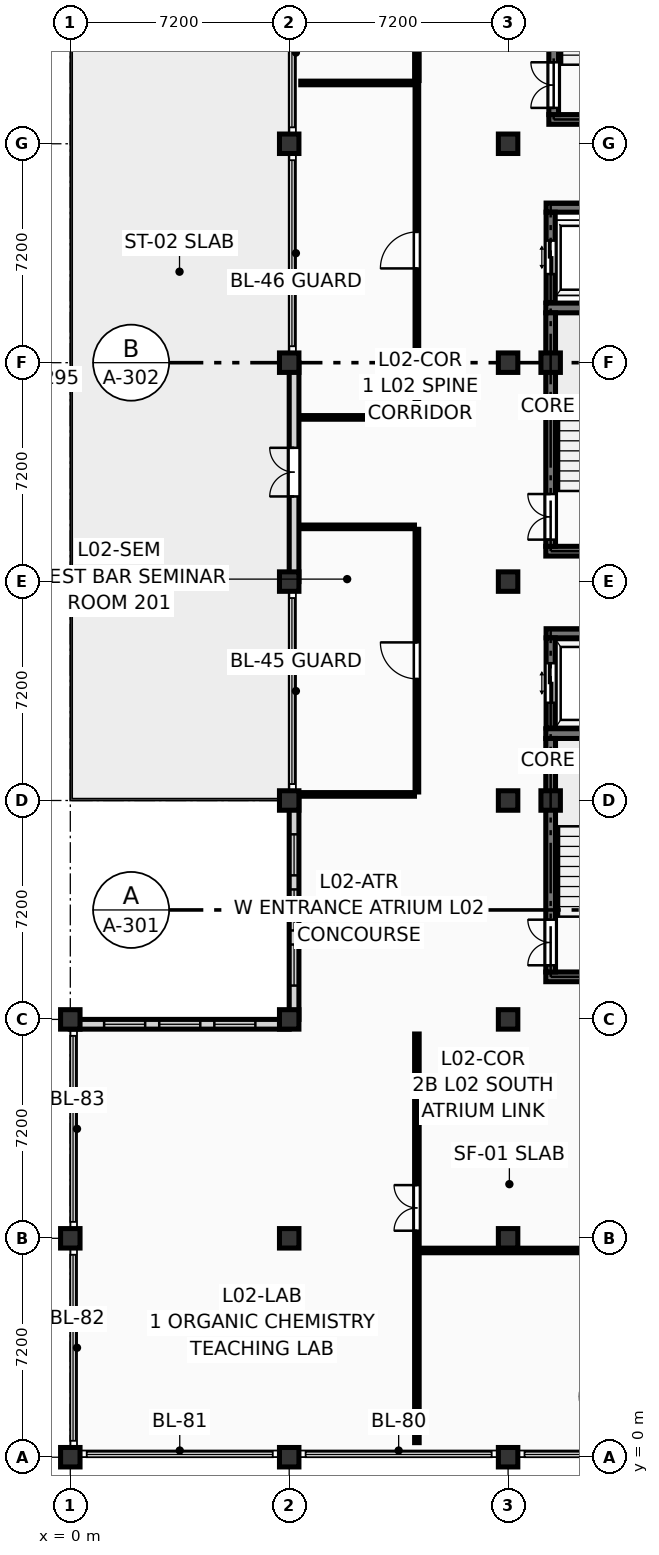
"""IFC4 building model, lengths in metres.
Left out: names, types, materials, properties, quantities, classifications, styles, units other than length and angle.
Written with IfcOpenShell. Run it as: python <this file> out.ifc"""

import sys

from ifc_helpers import new_model, si_unit, direction, frame, frame_2d, origin, origin_2d, place, context, subcontext, project, spatial, rectangle, extrude, element, fill, save


model = new_model("IFC4")
c1 = context("Model", 3, precision=1e-05, world=origin(), true_north=direction((0.0, 1.0)))
c2 = subcontext(c1, "Body", "Model", "MODEL_VIEW")
j1 = project(units=[si_unit("LENGTHUNIT", "METRE"), si_unit("PLANEANGLEUNIT", "RADIAN")], contexts=[c1])
p1 = place(None, origin())
s1 = spatial("IfcSite", under=j1, at=p1, CompositionType="ELEMENT")
p2 = place(p1, origin())
s2 = spatial("IfcBuilding", under=s1, at=p2, CompositionType="ELEMENT")
p3 = place(p2, frame((0.0, 0.0, 8.55)))
s3 = spatial("IfcBuildingStorey", under=s2, at=p3, CompositionType="ELEMENT", Elevation=8.55)
for number, where, z_axis, x_axis in (
    (1, (0.0, 0.0, 0.0), (0.0, 0.0, 1.0), (1.0, 0.0, 0.0)),
    (2, (0.0, 7.2, 0.0), (0.0, 0.0, 1.0), (1.0, 0.0, 0.0)),
    (3, (0.0, 14.4, 0.0), (0.0, 0.0, 1.0), (1.0, 0.0, 0.0)),
    (4, (7.2, 0.0, 0.0), (0.0, 0.0, 1.0), (1.0, 0.0, 0.0)),
    (5, (7.2, 7.2, 0.0), (0.0, 0.0, 1.0), (1.0, 0.0, 0.0)),
    (6, (7.2, 14.4, 0.0), (0.0, 0.0, 1.0), (1.0, 0.0, 0.0)),
    (7, (7.2, 21.6, 0.0), (0.0, 0.0, 1.0), (1.0, 0.0, 0.0)),
    (8, (7.2, 28.8, 0.0), (0.0, 0.0, 1.0), (1.0, 0.0, 0.0)),
    (9, (7.2, 36.0, 0.0), (0.0, 0.0, 1.0), (1.0, 0.0, 0.0)),
    (10, (7.2, 43.2, 0.0), (0.0, 0.0, 1.0), (1.0, 0.0, 0.0)),
    (11, (14.4, 0.0, 0.0), (0.0, 0.0, 1.0), (1.0, 0.0, 0.0)),
    (12, (14.4, 7.2, 0.0), (0.0, 0.0, 1.0), (1.0, 0.0, 0.0)),
    (13, (14.4, 14.4, 0.0), (0.0, 0.0, 1.0), (1.0, 0.0, 0.0)),
    (14, (14.4, 21.6, 0.0), (0.0, 0.0, 1.0), (1.0, 0.0, 0.0)),
    (15, (14.4, 28.8, 0.0), (0.0, 0.0, 1.0), (1.0, 0.0, 0.0)),
    (16, (14.4, 36.0, 0.0), (0.0, 0.0, 1.0), (1.0, 0.0, 0.0)),
    (17, (14.4, 43.2, 0.0), (0.0, 0.0, 1.0), (1.0, 0.0, 0.0)),
    (18, (15.8, 21.6, 0.0), (0.0, 0.0, 1.0), (1.0, 0.0, 0.0)),
    (19, (15.8, 36.0, 0.0), (0.0, 0.0, 1.0), (1.0, 0.0, 0.0)),
):
    element("IfcColumn", number, at=place(p3, frame(where, z_axis=z_axis, x_axis=x_axis)), inside=s3, PredefinedType="COLUMN", context=c2, shape_type="SweptSolid", body=[
        extrude(rectangle(XDim=0.64, YDim=0.64, at=origin_2d()), origin(), (0.0, 0.0, 1.0), 3.6),
    ])
p4 = place(p3, frame((7.36, 14.4, 0.0), z_axis=(0.0, 0.0, 1.0), x_axis=(0.0, 1.0, 0.0)))
e20 = element("IfcWall", 20, at=p4, inside=s3, PredefinedType="SOLIDWALL", context=c2, shape_type="SweptSolid", body=[
    extrude(rectangle(XDim=7.2, YDim=0.32, at=frame_2d((3.6, 0.0))), origin(), (0.0, 0.0, 1.0), 2.84),
])
p5 = place(p4, frame((1.113, 0.0, 0.18)))
e21 = element("IfcOpeningElement", 21, at=p5, cuts=e20, PredefinedType="OPENING", context=c2, shape_type="SweptSolid", body=[
    extrude(rectangle(XDim=1.35, YDim=2.45, at=frame_2d((0.675, 1.225))), frame((0.0, 0.172, 0.0), z_axis=(0.0, -1.0, 0.0), x_axis=(1.0, 0.0, 0.0)), (0.0, 0.0, 1.0), 0.344),
])
p6 = place(p4, frame((2.925, 0.0, 0.18)))
e22 = element("IfcOpeningElement", 22, at=p6, cuts=e20, PredefinedType="OPENING", context=c2, shape_type="SweptSolid", body=[
    extrude(rectangle(XDim=1.35, YDim=2.45, at=frame_2d((0.675, 1.225))), frame((0.0, 0.172, 0.0), z_axis=(0.0, -1.0, 0.0), x_axis=(1.0, 0.0, 0.0)), (0.0, 0.0, 1.0), 0.344),
])
p7 = place(p4, frame((4.738, 0.0, 0.18)))
e23 = element("IfcOpeningElement", 23, at=p7, cuts=e20, PredefinedType="OPENING", context=c2, shape_type="SweptSolid", body=[
    extrude(rectangle(XDim=1.35, YDim=2.45, at=frame_2d((0.675, 1.225))), frame((0.0, 0.172, 0.0), z_axis=(0.0, -1.0, 0.0), x_axis=(1.0, 0.0, 0.0)), (0.0, 0.0, 1.0), 0.344),
])
p8 = place(p3, frame((7.36, 28.8, 0.0), z_axis=(0.0, 0.0, 1.0), x_axis=(0.0, 1.0, 0.0)))
e24 = element("IfcWall", 24, at=p8, inside=s3, PredefinedType="SOLIDWALL", context=c2, shape_type="SweptSolid", body=[
    extrude(rectangle(XDim=7.2, YDim=0.32, at=frame_2d((3.6, 0.0))), origin(), (0.0, 0.0, 1.0), 2.84),
])
p9 = place(p8, frame((2.8, 0.0, 0.0)))
e25 = element("IfcOpeningElement", 25, at=p9, cuts=e24, PredefinedType="OPENING", context=c2, shape_type="SweptSolid", body=[
    extrude(rectangle(XDim=1.6, YDim=2.25, at=frame_2d((0.8, 1.125))), frame((0.0, 0.172, 0.0), z_axis=(0.0, -1.0, 0.0), x_axis=(1.0, 0.0, 0.0)), (0.0, 0.0, 1.0), 0.344),
])
p10 = place(p3, frame((0.0, 14.24, 0.0), z_axis=(0.0, 0.0, 1.0), x_axis=(1.0, 0.0, 0.0)))
e26 = element("IfcWall", 26, at=p10, inside=s3, PredefinedType="SOLIDWALL", context=c2, shape_type="SweptSolid", body=[
    extrude(rectangle(XDim=7.2, YDim=0.32, at=frame_2d((3.6, 0.0))), origin(), (0.0, 0.0, 1.0), 2.84),
])
p11 = place(p10, frame((1.113, 0.0, 0.18)))
e27 = element("IfcOpeningElement", 27, at=p11, cuts=e26, PredefinedType="OPENING", context=c2, shape_type="SweptSolid", body=[
    extrude(rectangle(XDim=1.35, YDim=2.45, at=frame_2d((0.675, 1.225))), frame((0.0, 0.172, 0.0), z_axis=(0.0, -1.0, 0.0), x_axis=(1.0, 0.0, 0.0)), (0.0, 0.0, 1.0), 0.344),
])
p12 = place(p10, frame((2.925, 0.0, 0.18)))
e28 = element("IfcOpeningElement", 28, at=p12, cuts=e26, PredefinedType="OPENING", context=c2, shape_type="SweptSolid", body=[
    extrude(rectangle(XDim=1.35, YDim=2.45, at=frame_2d((0.675, 1.225))), frame((0.0, 0.172, 0.0), z_axis=(0.0, -1.0, 0.0), x_axis=(1.0, 0.0, 0.0)), (0.0, 0.0, 1.0), 0.344),
])
p13 = place(p10, frame((4.738, 0.0, 0.18)))
e29 = element("IfcOpeningElement", 29, at=p13, cuts=e26, PredefinedType="OPENING", context=c2, shape_type="SweptSolid", body=[
    extrude(rectangle(XDim=1.35, YDim=2.45, at=frame_2d((0.675, 1.225))), frame((0.0, 0.172, 0.0), z_axis=(0.0, -1.0, 0.0), x_axis=(1.0, 0.0, 0.0)), (0.0, 0.0, 1.0), 0.344),
])
for number, where, z_axis, x_axis in (
    (30, (15.64, 15.8, 0.0), (0.0, 0.0, 1.0), (1.0, 0.0, 0.0)),
    (31, (15.64, 23.8, 0.0), (0.0, 0.0, 1.0), (1.0, 0.0, 0.0)),
):
    element("IfcWall", number, at=place(p3, frame(where, z_axis=z_axis, x_axis=x_axis)), inside=s3, PredefinedType="SHEAR", context=c2, shape_type="SweptSolid", body=[
        extrude(rectangle(XDim=4.84, YDim=0.32, at=frame_2d((2.42, 0.0))), origin(), (0.0, 0.0, 1.0), 3.39),
    ])
p14 = place(p3, frame((15.8, 15.96, 0.0), z_axis=(0.0, 0.0, 1.0), x_axis=(0.0, 1.0, 0.0)))
e32 = element("IfcWall", 32, at=p14, inside=s3, PredefinedType="SHEAR", context=c2, shape_type="SweptSolid", body=[
    extrude(rectangle(XDim=7.68, YDim=0.32, at=frame_2d((3.84, 0.0))), origin(), (0.0, 0.0, 1.0), 3.39),
])
p15 = place(p14, frame((0.22, 0.0, 0.0)))
e33 = element("IfcOpeningElement", 33, at=p15, cuts=e32, PredefinedType="OPENING", context=c2, shape_type="SweptSolid", body=[
    extrude(rectangle(XDim=1.5, YDim=2.2, at=frame_2d((0.75, 1.1))), frame((0.0, 0.172, 0.0), z_axis=(0.0, -1.0, 0.0), x_axis=(1.0, 0.0, 0.0)), (0.0, 0.0, 1.0), 0.344),
])
for number, where, z_axis, x_axis in (
    (34, (15.64, 29.8, 0.0), (0.0, 0.0, 1.0), (1.0, 0.0, 0.0)),
    (35, (15.64, 37.8, 0.0), (0.0, 0.0, 1.0), (1.0, 0.0, 0.0)),
):
    element("IfcWall", number, at=place(p3, frame(where, z_axis=z_axis, x_axis=x_axis)), inside=s3, PredefinedType="SHEAR", context=c2, shape_type="SweptSolid", body=[
        extrude(rectangle(XDim=4.84, YDim=0.32, at=frame_2d((2.42, 0.0))), origin(), (0.0, 0.0, 1.0), 3.39),
    ])
p16 = place(p3, frame((15.8, 29.96, 0.0), z_axis=(0.0, 0.0, 1.0), x_axis=(0.0, 1.0, 0.0)))
e36 = element("IfcWall", 36, at=p16, inside=s3, PredefinedType="SHEAR", context=c2, shape_type="SweptSolid", body=[
    extrude(rectangle(XDim=7.68, YDim=0.32, at=frame_2d((3.84, 0.0))), origin(), (0.0, 0.0, 1.0), 3.39),
])
p17 = place(p16, frame((0.22, 0.0, 0.0)))
e37 = element("IfcOpeningElement", 37, at=p17, cuts=e36, PredefinedType="OPENING", context=c2, shape_type="SweptSolid", body=[
    extrude(rectangle(XDim=1.5, YDim=2.2, at=frame_2d((0.75, 1.1))), frame((0.0, 0.172, 0.0), z_axis=(0.0, -1.0, 0.0), x_axis=(1.0, 0.0, 0.0)), (0.0, 0.0, 1.0), 0.344),
])
p18 = place(p3, frame((15.74, 44.0, 0.0), z_axis=(0.0, 0.0, 1.0), x_axis=(1.0, 0.0, 0.0)))
e38 = element("IfcWall", 38, at=p18, inside=s3, PredefinedType="SHEAR", context=c2, shape_type="SweptSolid", body=[
    extrude(rectangle(XDim=4.44, YDim=0.32, at=frame_2d((2.22, 0.0))), origin(), (0.0, 0.0, 1.0), 3.39),
])
p19 = place(p3, frame((15.9, 44.16, 0.0), z_axis=(0.0, 0.0, 1.0), x_axis=(0.0, 1.0, 0.0)))
e39 = element("IfcWall", 39, at=p19, inside=s3, PredefinedType="SHEAR", context=c2, shape_type="SweptSolid", body=[
    extrude(rectangle(XDim=7.28, YDim=0.32, at=frame_2d((3.64, 0.0))), origin(), (0.0, 0.0, 1.0), 3.39),
])
p20 = place(p19, frame((0.22, 0.0, 0.0)))
e40 = element("IfcOpeningElement", 40, at=p20, cuts=e39, PredefinedType="OPENING", context=c2, shape_type="SweptSolid", body=[
    extrude(rectangle(XDim=1.5, YDim=2.2, at=frame_2d((0.75, 1.1))), frame((0.0, 0.172, 0.0), z_axis=(0.0, -1.0, 0.0), x_axis=(1.0, 0.0, 0.0)), (0.0, 0.0, 1.0), 0.344),
])
p21 = place(p3, frame((15.65, 27.1, 0.0), z_axis=(0.0, 0.0, 1.0), x_axis=(1.0, 0.0, 0.0)))
e41 = element("IfcWall", 41, at=p21, inside=s3, PredefinedType="SHEAR", context=c2, shape_type="SweptSolid", body=[
    extrude(rectangle(XDim=2.56, YDim=0.3, at=frame_2d((1.28, 0.0))), origin(), (0.0, 0.0, 1.0), 3.39),
])
p22 = place(p3, frame((15.8, 23.98, 0.0), z_axis=(0.0, 0.0, 1.0), x_axis=(0.0, 1.0, 0.0)))
e42 = element("IfcWall", 42, at=p22, inside=s3, PredefinedType="SHEAR", context=c2, shape_type="SweptSolid", body=[
    extrude(rectangle(XDim=2.97, YDim=0.3, at=frame_2d((1.485, 0.0))), origin(), (0.0, 0.0, 1.0), 3.39),
])
p23 = place(p22, frame((0.835, 0.0, 0.0)))
e43 = element("IfcOpeningElement", 43, at=p23, cuts=e42, PredefinedType="OPENING", context=c2, shape_type="SweptSolid", body=[
    extrude(rectangle(XDim=1.3, YDim=2.25, at=frame_2d((0.65, 1.125))), frame((0.0, 0.162, 0.0), z_axis=(0.0, -1.0, 0.0), x_axis=(1.0, 0.0, 0.0)), (0.0, 0.0, 1.0), 0.324),
])
p24 = place(p3, frame((15.65, 41.1, 0.0), z_axis=(0.0, 0.0, 1.0), x_axis=(1.0, 0.0, 0.0)))
e44 = element("IfcWall", 44, at=p24, inside=s3, PredefinedType="SHEAR", context=c2, shape_type="SweptSolid", body=[
    extrude(rectangle(XDim=2.56, YDim=0.3, at=frame_2d((1.28, 0.0))), origin(), (0.0, 0.0, 1.0), 3.39),
])
p25 = place(p3, frame((15.8, 37.98, 0.0), z_axis=(0.0, 0.0, 1.0), x_axis=(0.0, 1.0, 0.0)))
e45 = element("IfcWall", 45, at=p25, inside=s3, PredefinedType="SHEAR", context=c2, shape_type="SweptSolid", body=[
    extrude(rectangle(XDim=2.97, YDim=0.3, at=frame_2d((1.485, 0.0))), origin(), (0.0, 0.0, 1.0), 3.39),
])
p26 = place(p25, frame((0.935, 0.0, 0.0)))
e46 = element("IfcOpeningElement", 46, at=p26, cuts=e45, PredefinedType="OPENING", context=c2, shape_type="SweptSolid", body=[
    extrude(rectangle(XDim=1.1, YDim=2.2, at=frame_2d((0.55, 1.1))), frame((0.0, 0.162, 0.0), z_axis=(0.0, -1.0, 0.0), x_axis=(1.0, 0.0, 0.0)), (0.0, 0.0, 1.0), 0.324),
])
p27 = place(p3, frame((11.4, 0.48, 0.0), z_axis=(0.0, 0.0, 1.0), x_axis=(0.0, 1.0, 0.0)))
e47 = element("IfcWall", 47, at=p27, inside=s3, PredefinedType="PARTITIONING", context=c2, shape_type="SweptSolid", body=[
    extrude(rectangle(XDim=13.44, YDim=0.15, at=frame_2d((6.72, 0.0))), origin(), (0.0, 0.0, 1.0), 3.375),
])
p28 = place(p27, frame((6.97, 0.0, 0.0)))
e48 = element("IfcOpeningElement", 48, at=p28, cuts=e47, PredefinedType="OPENING", context=c2, shape_type="SweptSolid", body=[
    extrude(rectangle(XDim=1.5, YDim=2.2, at=frame_2d((0.75, 1.1))), frame((0.0, 0.087, 0.0), z_axis=(0.0, -1.0, 0.0), x_axis=(1.0, 0.0, 0.0)), (0.0, 0.0, 1.0), 0.174),
])
p29 = place(p3, frame((11.515, 6.8, 0.0), z_axis=(0.0, 0.0, 1.0), x_axis=(1.0, 0.0, 0.0)))
e49 = element("IfcWall", 49, at=p29, inside=s3, PredefinedType="PARTITIONING", context=c2, shape_type="SweptSolid", body=[
    extrude(rectangle(XDim=17.005, YDim=0.15, at=frame_2d((8.502, 0.0))), origin(), (0.0, 0.0, 1.0), 3.375),
])
p30 = place(p29, frame((6.497, 0.0, 0.0)))
e50 = element("IfcOpeningElement", 50, at=p30, cuts=e49, PredefinedType="OPENING", context=c2, shape_type="SweptSolid", body=[
    extrude(rectangle(XDim=1.5, YDim=2.2, at=frame_2d((0.75, 1.1))), frame((0.0, 0.087, 0.0), z_axis=(0.0, -1.0, 0.0), x_axis=(1.0, 0.0, 0.0)), (0.0, 0.0, 1.0), 0.174),
])
p31 = place(p3, frame((7.58, 21.8, 0.0), z_axis=(0.0, 0.0, 1.0), x_axis=(1.0, 0.0, 0.0)))
e51 = element("IfcWall", 51, at=p31, inside=s3, PredefinedType="PARTITIONING", context=c2, shape_type="SweptSolid", body=[
    extrude(rectangle(XDim=3.74, YDim=0.12, at=frame_2d((1.87, 0.0))), origin(), (0.0, 0.0, 1.0), 2.595),
])
p32 = place(p3, frame((11.4, 21.88, 0.0), z_axis=(0.0, 0.0, 1.0), x_axis=(0.0, 1.0, 0.0)))
e52 = element("IfcWall", 52, at=p32, inside=s3, PredefinedType="PARTITIONING", context=c2, shape_type="SweptSolid", body=[
    extrude(rectangle(XDim=8.64, YDim=0.12, at=frame_2d((4.32, 0.0))), origin(), (0.0, 0.0, 1.0), 3.375),
])
p33 = place(p32, frame((3.72, 0.0, 0.0)))
e53 = element("IfcOpeningElement", 53, at=p33, cuts=e52, PredefinedType="OPENING", context=c2, shape_type="SweptSolid", body=[
    extrude(rectangle(XDim=1.2, YDim=2.15, at=frame_2d((0.6, 1.075))), frame((0.0, 0.072, 0.0), z_axis=(0.0, -1.0, 0.0), x_axis=(1.0, 0.0, 0.0)), (0.0, 0.0, 1.0), 0.144),
])
for number, where, z_axis, x_axis in (
    (54, (7.58, 30.6, 0.0), (0.0, 0.0, 1.0), (1.0, 0.0, 0.0)),
    (55, (7.58, 34.2, 0.0), (0.0, 0.0, 1.0), (1.0, 0.0, 0.0)),
):
    element("IfcWall", number, at=place(p3, frame(where, z_axis=z_axis, x_axis=x_axis)), inside=s3, PredefinedType="PARTITIONING", context=c2, shape_type="SweptSolid", body=[
        extrude(rectangle(XDim=3.74, YDim=0.12, at=frame_2d((1.87, 0.0))), origin(), (0.0, 0.0, 1.0), 3.375),
    ])
p34 = place(p3, frame((11.4, 34.28, 0.0), z_axis=(0.0, 0.0, 1.0), x_axis=(0.0, 1.0, 0.0)))
e56 = element("IfcWall", 56, at=p34, inside=s3, PredefinedType="PARTITIONING", context=c2, shape_type="SweptSolid", body=[
    extrude(rectangle(XDim=10.84, YDim=0.12, at=frame_2d((5.42, 0.0))), origin(), (0.0, 0.0, 1.0), 3.375),
])
p35 = place(p34, frame((4.82, 0.0, 0.0)))
e57 = element("IfcOpeningElement", 57, at=p35, cuts=e56, PredefinedType="OPENING", context=c2, shape_type="SweptSolid", body=[
    extrude(rectangle(XDim=1.2, YDim=2.15, at=frame_2d((0.6, 1.075))), frame((0.0, 0.072, 0.0), z_axis=(0.0, -1.0, 0.0), x_axis=(1.0, 0.0, 0.0)), (0.0, 0.0, 1.0), 0.144),
])
p36 = place(p3, frame((7.58, 45.2, 0.0), z_axis=(0.0, 0.0, 1.0), x_axis=(1.0, 0.0, 0.0)))
e58 = element("IfcWall", 58, at=p36, inside=s3, PredefinedType="PARTITIONING", context=c2, shape_type="SweptSolid", body=[
    extrude(rectangle(XDim=3.74, YDim=0.12, at=frame_2d((1.87, 0.0))), origin(), (0.0, 0.0, 1.0), 3.375),
])
p37 = place(p3, frame((11.4, 45.28, 0.0), z_axis=(0.0, 0.0, 1.0), x_axis=(0.0, 1.0, 0.0)))
e59 = element("IfcWall", 59, at=p37, inside=s3, PredefinedType="PARTITIONING", context=c2, shape_type="SweptSolid", body=[
    extrude(rectangle(XDim=10.64, YDim=0.15, at=frame_2d((5.32, 0.0))), origin(), (0.0, 0.0, 1.0), 3.375),
])
p38 = place(p37, frame((4.57, 0.0, 0.0)))
e60 = element("IfcOpeningElement", 60, at=p38, cuts=e59, PredefinedType="OPENING", context=c2, shape_type="SweptSolid", body=[
    extrude(rectangle(XDim=1.5, YDim=2.2, at=frame_2d((0.75, 1.1))), frame((0.0, 0.087, 0.0), z_axis=(0.0, -1.0, 0.0), x_axis=(1.0, 0.0, 0.0)), (0.0, 0.0, 1.0), 0.174),
])
p39 = place(p5, origin())
e61 = element("IfcWindow", 61, at=p39, inside=s3, PartitioningType="SINGLE_PANEL", PredefinedType="WINDOW", context=c2, shape_type="SweptSolid", body=[
    extrude(rectangle(XDim=1.35, YDim=2.45, at=frame_2d((0.675, 1.225))), frame((0.0, 0.03, 0.0), z_axis=(0.0, -1.0, 0.0), x_axis=(1.0, 0.0, 0.0)), (0.0, 0.0, 1.0), 0.06),
])
fill(e21, e61)
p40 = place(p6, origin())
e62 = element("IfcWindow", 62, at=p40, inside=s3, PartitioningType="SINGLE_PANEL", PredefinedType="WINDOW", context=c2, shape_type="SweptSolid", body=[
    extrude(rectangle(XDim=1.35, YDim=2.45, at=frame_2d((0.675, 1.225))), frame((0.0, 0.03, 0.0), z_axis=(0.0, -1.0, 0.0), x_axis=(1.0, 0.0, 0.0)), (0.0, 0.0, 1.0), 0.06),
])
fill(e22, e62)
p41 = place(p7, origin())
e63 = element("IfcWindow", 63, at=p41, inside=s3, PartitioningType="SINGLE_PANEL", PredefinedType="WINDOW", context=c2, shape_type="SweptSolid", body=[
    extrude(rectangle(XDim=1.35, YDim=2.45, at=frame_2d((0.675, 1.225))), frame((0.0, 0.03, 0.0), z_axis=(0.0, -1.0, 0.0), x_axis=(1.0, 0.0, 0.0)), (0.0, 0.0, 1.0), 0.06),
])
fill(e23, e63)
p42 = place(p9, origin())
e64 = element("IfcDoor", 64, at=p42, inside=s3, OperationType="DOUBLE_DOOR_SINGLE_SWING", PredefinedType="DOOR", context=c2, shape_type="SweptSolid", body=[
    extrude(rectangle(XDim=1.6, YDim=2.25, at=frame_2d((0.8, 1.125))), frame((0.0, 0.025, 0.0), z_axis=(0.0, -1.0, 0.0), x_axis=(1.0, 0.0, 0.0)), (0.0, 0.0, 1.0), 0.05),
])
fill(e25, e64)
p43 = place(p11, origin())
e65 = element("IfcWindow", 65, at=p43, inside=s3, PartitioningType="SINGLE_PANEL", PredefinedType="WINDOW", context=c2, shape_type="SweptSolid", body=[
    extrude(rectangle(XDim=1.35, YDim=2.45, at=frame_2d((0.675, 1.225))), frame((0.0, 0.03, 0.0), z_axis=(0.0, -1.0, 0.0), x_axis=(1.0, 0.0, 0.0)), (0.0, 0.0, 1.0), 0.06),
])
fill(e27, e65)
p44 = place(p12, origin())
e66 = element("IfcWindow", 66, at=p44, inside=s3, PartitioningType="SINGLE_PANEL", PredefinedType="WINDOW", context=c2, shape_type="SweptSolid", body=[
    extrude(rectangle(XDim=1.35, YDim=2.45, at=frame_2d((0.675, 1.225))), frame((0.0, 0.03, 0.0), z_axis=(0.0, -1.0, 0.0), x_axis=(1.0, 0.0, 0.0)), (0.0, 0.0, 1.0), 0.06),
])
fill(e28, e66)
p45 = place(p13, origin())
e67 = element("IfcWindow", 67, at=p45, inside=s3, PartitioningType="SINGLE_PANEL", PredefinedType="WINDOW", context=c2, shape_type="SweptSolid", body=[
    extrude(rectangle(XDim=1.35, YDim=2.45, at=frame_2d((0.675, 1.225))), frame((0.0, 0.03, 0.0), z_axis=(0.0, -1.0, 0.0), x_axis=(1.0, 0.0, 0.0)), (0.0, 0.0, 1.0), 0.06),
])
fill(e29, e67)
p46 = place(p15, origin())
e68 = element("IfcDoor", 68, at=p46, inside=s3, OperationType="DOUBLE_DOOR_SINGLE_SWING", PredefinedType="DOOR", context=c2, shape_type="SweptSolid", body=[
    extrude(rectangle(XDim=1.5, YDim=2.2, at=frame_2d((0.75, 1.1))), frame((0.0, 0.025, 0.0), z_axis=(0.0, -1.0, 0.0), x_axis=(1.0, 0.0, 0.0)), (0.0, 0.0, 1.0), 0.05),
])
fill(e33, e68)
p47 = place(p17, origin())
e69 = element("IfcDoor", 69, at=p47, inside=s3, OperationType="DOUBLE_DOOR_SINGLE_SWING", PredefinedType="DOOR", context=c2, shape_type="SweptSolid", body=[
    extrude(rectangle(XDim=1.5, YDim=2.2, at=frame_2d((0.75, 1.1))), frame((0.0, 0.025, 0.0), z_axis=(0.0, -1.0, 0.0), x_axis=(1.0, 0.0, 0.0)), (0.0, 0.0, 1.0), 0.05),
])
fill(e37, e69)
p48 = place(p20, origin())
e70 = element("IfcDoor", 70, at=p48, inside=s3, OperationType="DOUBLE_DOOR_SINGLE_SWING", PredefinedType="DOOR", context=c2, shape_type="SweptSolid", body=[
    extrude(rectangle(XDim=1.5, YDim=2.2, at=frame_2d((0.75, 1.1))), frame((0.0, 0.025, 0.0), z_axis=(0.0, -1.0, 0.0), x_axis=(1.0, 0.0, 0.0)), (0.0, 0.0, 1.0), 0.05),
])
fill(e40, e70)
p49 = place(p23, origin())
e71 = element("IfcDoor", 71, at=p49, inside=s3, OperationType="DOUBLE_DOOR_SLIDING", PredefinedType="DOOR", context=c2, shape_type="SweptSolid", body=[
    extrude(rectangle(XDim=1.3, YDim=2.25, at=frame_2d((0.65, 1.125))), frame((0.0, 0.025, 0.0), z_axis=(0.0, -1.0, 0.0), x_axis=(1.0, 0.0, 0.0)), (0.0, 0.0, 1.0), 0.05),
])
fill(e43, e71)
p50 = place(p26, origin())
e72 = element("IfcDoor", 72, at=p50, inside=s3, OperationType="DOUBLE_DOOR_SLIDING", PredefinedType="DOOR", context=c2, shape_type="SweptSolid", body=[
    extrude(rectangle(XDim=1.1, YDim=2.2, at=frame_2d((0.55, 1.1))), frame((0.0, 0.025, 0.0), z_axis=(0.0, -1.0, 0.0), x_axis=(1.0, 0.0, 0.0)), (0.0, 0.0, 1.0), 0.05),
])
fill(e46, e72)
p51 = place(p28, origin())
e73 = element("IfcDoor", 73, at=p51, inside=s3, OperationType="DOUBLE_DOOR_SINGLE_SWING", PredefinedType="DOOR", context=c2, shape_type="SweptSolid", body=[
    extrude(rectangle(XDim=1.5, YDim=2.2, at=frame_2d((0.75, 1.1))), frame((0.0, 0.025, 0.0), z_axis=(0.0, -1.0, 0.0), x_axis=(1.0, 0.0, 0.0)), (0.0, 0.0, 1.0), 0.05),
])
fill(e48, e73)
p52 = place(p33, origin())
e74 = element("IfcDoor", 74, at=p52, inside=s3, OperationType="SINGLE_SWING_RIGHT", PredefinedType="DOOR", context=c2, shape_type="SweptSolid", body=[
    extrude(rectangle(XDim=1.2, YDim=2.15, at=frame_2d((0.6, 1.075))), frame((0.0, 0.025, 0.0), z_axis=(0.0, -1.0, 0.0), x_axis=(1.0, 0.0, 0.0)), (0.0, 0.0, 1.0), 0.05),
])
fill(e53, e74)
p53 = place(p35, origin())
e75 = element("IfcDoor", 75, at=p53, inside=s3, OperationType="SINGLE_SWING_LEFT", PredefinedType="DOOR", context=c2, shape_type="SweptSolid", body=[
    extrude(rectangle(XDim=1.2, YDim=2.15, at=frame_2d((0.6, 1.075))), frame((0.0, 0.025, 0.0), z_axis=(0.0, -1.0, 0.0), x_axis=(1.0, 0.0, 0.0)), (0.0, 0.0, 1.0), 0.05),
])
fill(e57, e75)
save(model, sys.argv[1])
